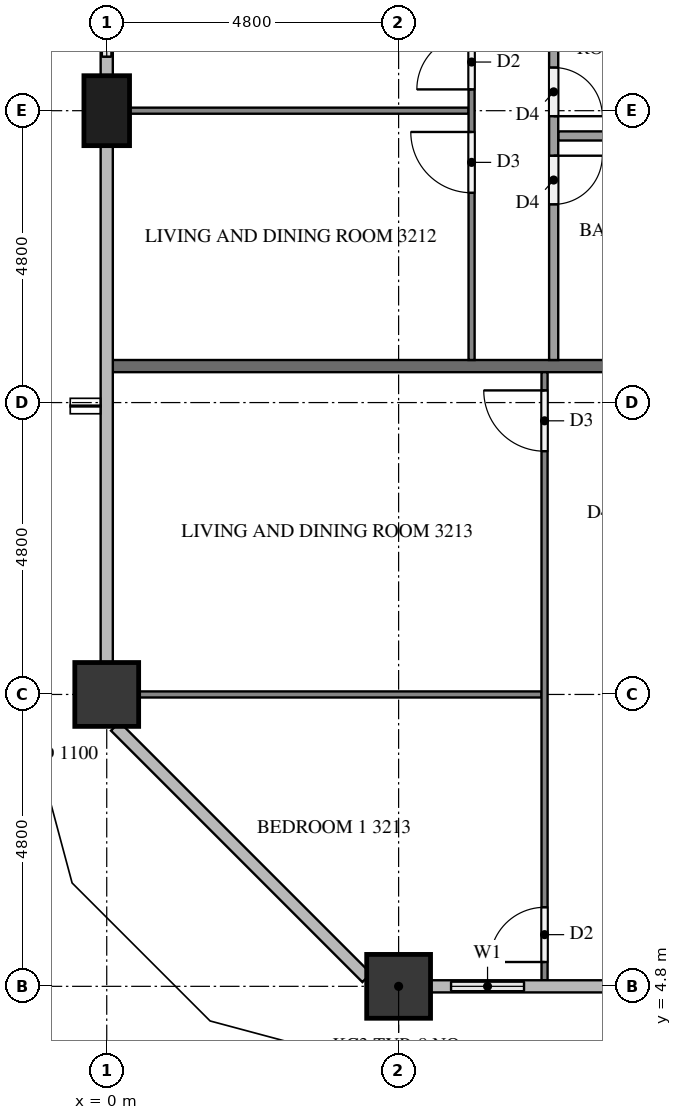
"""IFC4 building model, lengths in metres.
Left out: names, types, materials, properties, quantities, classifications, styles, units other than length and angle.
Written with IfcOpenShell. Run it as: python <this file> out.ifc"""

import sys

from ifc_helpers import new_model, si_unit, direction, frame, frame_2d, origin, origin_2d, place, context, subcontext, project, spatial, rectangle, extrude, element, fill, save


model = new_model("IFC4")
c1 = context("Model", 3, precision=1e-05, world=origin(), true_north=direction((0.0, 1.0)))
c2 = subcontext(c1, "Body", "Model", "MODEL_VIEW")
j1 = project(units=[si_unit("LENGTHUNIT", "METRE"), si_unit("PLANEANGLEUNIT", "RADIAN")], contexts=[c1])
p1 = place(None, origin())
s1 = spatial("IfcSite", under=j1, at=p1, CompositionType="ELEMENT")
p2 = place(p1, origin())
s2 = spatial("IfcBuilding", under=s1, at=p2, CompositionType="ELEMENT")
p3 = place(p2, frame((0.0, 0.0, 126.1)))
s3 = spatial("IfcBuildingStorey", under=s2, at=p3, CompositionType="ELEMENT", Elevation=126.1)
p4 = place(p3, frame((4.8, 4.8, 0.0), z_axis=(0.0, 0.0, 1.0), x_axis=(1.0, 0.0, 0.0)))
e1 = element("IfcColumn", 1, at=p4, inside=s3, PredefinedType="COLUMN", context=c2, shape_type="SweptSolid", body=[
    extrude(rectangle(XDim=1.05, YDim=1.05, at=origin_2d()), origin(), (0.0, 0.0, 1.0), 3.2),
])
p5 = place(p3, frame((0.0, 19.2, 0.0), z_axis=(0.0, 0.0, 1.0), x_axis=(0.0, 1.0, 0.0)))
e2 = element("IfcColumn", 2, at=p5, inside=s3, PredefinedType="COLUMN", context=c2, shape_type="SweptSolid", body=[
    extrude(rectangle(XDim=1.15, YDim=0.75, at=origin_2d()), origin(), (0.0, 0.0, 1.0), 3.2),
])
p6 = place(p3, frame((0.0, 9.6, 0.0), z_axis=(0.0, 0.0, 1.0), x_axis=(1.0, 0.0, 0.0)))
e3 = element("IfcColumn", 3, at=p6, inside=s3, PredefinedType="COLUMN", context=c2, shape_type="SweptSolid", body=[
    extrude(rectangle(XDim=1.05, YDim=1.05, at=origin_2d()), origin(), (0.0, 0.0, 1.0), 3.2),
])
p7 = place(p3, frame((5.325, 4.8, 0.0), z_axis=(0.0, 0.0, 1.0), x_axis=(1.0, 0.0, 0.0)))
e4 = element("IfcWall", 4, at=p7, inside=s3, PredefinedType="SOLIDWALL", context=c2, shape_type="SweptSolid", body=[
    extrude(rectangle(XDim=1.875, YDim=0.15, at=frame_2d((0.938, 0.0))), origin(), (0.0, 0.0, 1.0), 3.2),
])
p8 = place(p7, frame((0.337, 0.0, 0.9)))
e5 = element("IfcOpeningElement", 5, at=p8, cuts=e4, PredefinedType="OPENING", context=c2, shape_type="SweptSolid", body=[
    extrude(rectangle(XDim=1.2, YDim=1.4, at=frame_2d((0.6, 0.7))), frame((0.0, 0.085, 0.0), z_axis=(0.0, -1.0, 0.0), x_axis=(1.0, 0.0, 0.0)), (0.0, 0.0, 1.0), 0.17),
])
p9 = place(p3, frame((0.0, 21.6, 0.0), z_axis=(0.0, 0.0, 1.0), x_axis=(0.0, -1.0, 0.0)))
e6 = element("IfcWall", 6, at=p9, inside=s3, PredefinedType="SOLIDWALL", context=c2, shape_type="SweptSolid", body=[
    extrude(rectangle(XDim=1.825, YDim=0.15, at=frame_2d((0.913, 0.0))), origin(), (0.0, 0.0, 1.0), 3.2),
])
p10 = place(p9, frame((0.312, 0.0, 0.9)))
e7 = element("IfcOpeningElement", 7, at=p10, cuts=e6, PredefinedType="OPENING", context=c2, shape_type="SweptSolid", body=[
    extrude(rectangle(XDim=1.2, YDim=1.4, at=frame_2d((0.6, 0.7))), frame((0.0, 0.085, 0.0), z_axis=(0.0, -1.0, 0.0), x_axis=(1.0, 0.0, 0.0)), (0.0, 0.0, 1.0), 0.17),
])
p11 = place(p3, frame((0.1, 15.0, 0.0), z_axis=(0.0, 0.0, 1.0), x_axis=(1.0, 0.0, 0.0)))
e8 = element("IfcWall", 8, at=p11, inside=s3, PredefinedType="PARTITIONING", context=c2, shape_type="SweptSolid", body=[
    extrude(rectangle(XDim=9.8, YDim=0.2, at=frame_2d((4.9, 0.0))), origin(), (0.0, 0.0, 1.0), 3.2),
])
p12 = place(p3, frame((5.95, 19.2, 0.0), z_axis=(0.0, 0.0, 1.0), x_axis=(-1.0, 0.0, 0.0)))
e9 = element("IfcWall", 9, at=p12, inside=s3, PredefinedType="PARTITIONING", context=c2, shape_type="SweptSolid", body=[
    extrude(rectangle(XDim=5.575, YDim=0.1, at=frame_2d((2.788, 0.0))), origin(), (0.0, 0.0, 1.0), 3.2),
])
p13 = place(p3, frame((6.0, 15.1, 0.0), z_axis=(0.0, 0.0, 1.0), x_axis=(0.0, 1.0, 0.0)))
e10 = element("IfcWall", 10, at=p13, inside=s3, PredefinedType="PARTITIONING", context=c2, shape_type="SweptSolid", body=[
    extrude(rectangle(XDim=13.6, YDim=0.1, at=frame_2d((6.8, 0.0))), origin(), (0.0, 0.0, 1.0), 3.2),
])
p14 = place(p13, frame((12.4, 0.0, 0.0)))
e11 = element("IfcOpeningElement", 11, at=p14, cuts=e10, PredefinedType="OPENING", context=c2, shape_type="SweptSolid", body=[
    extrude(rectangle(XDim=0.9, YDim=2.1, at=frame_2d((0.45, 1.05))), frame((0.0, 0.06, 0.0), z_axis=(0.0, -1.0, 0.0), x_axis=(1.0, 0.0, 0.0)), (0.0, 0.0, 1.0), 0.12),
])
p15 = place(p13, frame((4.45, 0.0, 0.0)))
e12 = element("IfcOpeningElement", 12, at=p15, cuts=e10, PredefinedType="OPENING", context=c2, shape_type="SweptSolid", body=[
    extrude(rectangle(XDim=0.9, YDim=2.1, at=frame_2d((0.45, 1.05))), frame((0.0, 0.06, 0.0), z_axis=(0.0, -1.0, 0.0), x_axis=(1.0, 0.0, 0.0)), (0.0, 0.0, 1.0), 0.12),
])
p16 = place(p13, frame((2.75, 0.0, 0.0)))
e13 = element("IfcOpeningElement", 13, at=p16, cuts=e10, PredefinedType="OPENING", context=c2, shape_type="SweptSolid", body=[
    extrude(rectangle(XDim=1.0, YDim=2.1, at=frame_2d((0.5, 1.05))), frame((0.0, 0.06, 0.0), z_axis=(0.0, -1.0, 0.0), x_axis=(1.0, 0.0, 0.0)), (0.0, 0.0, 1.0), 0.12),
])
p17 = place(p3, frame((9.9, 18.785, 0.0), z_axis=(0.0, 0.0, 1.0), x_axis=(-1.0, 0.0, 0.0)))
e14 = element("IfcWall", 14, at=p17, inside=s3, PredefinedType="PARTITIONING", context=c2, shape_type="SweptSolid", body=[
    extrude(rectangle(XDim=2.475, YDim=0.15, at=frame_2d((1.237, 0.0))), origin(), (0.0, 0.0, 1.0), 3.2),
])
p18 = place(p3, frame((7.35, 27.075, 0.0), z_axis=(0.0, 0.0, 1.0), x_axis=(0.0, -1.0, 0.0)))
e15 = element("IfcWall", 15, at=p18, inside=s3, PredefinedType="PARTITIONING", context=c2, shape_type="SweptSolid", body=[
    extrude(rectangle(XDim=11.975, YDim=0.15, at=frame_2d((5.987, 0.0))), origin(), (0.0, 0.0, 1.0), 3.2),
])
p19 = place(p18, frame((0.3, 0.0, 0.0)))
e16 = element("IfcOpeningElement", 16, at=p19, cuts=e15, PredefinedType="OPENING", context=c2, shape_type="SweptSolid", body=[
    extrude(rectangle(XDim=0.9, YDim=2.1, at=frame_2d((0.45, 1.05))), frame((0.0, 0.085, 0.0), z_axis=(0.0, -1.0, 0.0), x_axis=(1.0, 0.0, 0.0)), (0.0, 0.0, 1.0), 0.17),
])
p20 = place(p18, frame((7.165, 0.0, 0.0)))
e17 = element("IfcOpeningElement", 17, at=p20, cuts=e15, PredefinedType="OPENING", context=c2, shape_type="SweptSolid", body=[
    extrude(rectangle(XDim=0.8, YDim=2.1, at=frame_2d((0.4, 1.05))), frame((0.0, 0.085, 0.0), z_axis=(0.0, -1.0, 0.0), x_axis=(1.0, 0.0, 0.0)), (0.0, 0.0, 1.0), 0.17),
])
p21 = place(p18, frame((8.615, 0.0, 0.0)))
e18 = element("IfcOpeningElement", 18, at=p21, cuts=e15, PredefinedType="OPENING", context=c2, shape_type="SweptSolid", body=[
    extrude(rectangle(XDim=0.8, YDim=2.1, at=frame_2d((0.4, 1.05))), frame((0.0, 0.085, 0.0), z_axis=(0.0, -1.0, 0.0), x_axis=(1.0, 0.0, 0.0)), (0.0, 0.0, 1.0), 0.17),
])
p22 = place(p3, frame((7.15, 9.6, 0.0), z_axis=(0.0, 0.0, 1.0), x_axis=(-1.0, 0.0, 0.0)))
e19 = element("IfcWall", 19, at=p22, inside=s3, PredefinedType="PARTITIONING", context=c2, shape_type="SweptSolid", body=[
    extrude(rectangle(XDim=6.625, YDim=0.1, at=frame_2d((3.312, 0.0))), origin(), (0.0, 0.0, 1.0), 3.2),
])
p23 = place(p3, frame((7.2, 4.9, 0.0), z_axis=(0.0, 0.0, 1.0), x_axis=(0.0, 1.0, 0.0)))
e20 = element("IfcWall", 20, at=p23, inside=s3, PredefinedType="PARTITIONING", context=c2, shape_type="SweptSolid", body=[
    extrude(rectangle(XDim=10.0, YDim=0.1, at=frame_2d((5.0, 0.0))), origin(), (0.0, 0.0, 1.0), 3.2),
])
p24 = place(p23, frame((8.7, 0.0, 0.0)))
e21 = element("IfcOpeningElement", 21, at=p24, cuts=e20, PredefinedType="OPENING", context=c2, shape_type="SweptSolid", body=[
    extrude(rectangle(XDim=1.0, YDim=2.1, at=frame_2d((0.5, 1.05))), frame((0.0, 0.06, 0.0), z_axis=(0.0, -1.0, 0.0), x_axis=(1.0, 0.0, 0.0)), (0.0, 0.0, 1.0), 0.12),
])
p25 = place(p23, frame((0.3, 0.0, 0.0)))
e22 = element("IfcOpeningElement", 22, at=p25, cuts=e20, PredefinedType="OPENING", context=c2, shape_type="SweptSolid", body=[
    extrude(rectangle(XDim=0.9, YDim=2.1, at=frame_2d((0.45, 1.05))), frame((0.0, 0.06, 0.0), z_axis=(0.0, -1.0, 0.0), x_axis=(1.0, 0.0, 0.0)), (0.0, 0.0, 1.0), 0.12),
])
p26 = place(p8, origin())
e23 = element("IfcWindow", 23, at=p26, inside=s3, PartitioningType="SINGLE_PANEL", PredefinedType="WINDOW", context=c2, shape_type="SweptSolid", body=[
    extrude(rectangle(XDim=1.2, YDim=1.4, at=frame_2d((0.6, 0.7))), frame((0.0, 0.03, 0.0), z_axis=(0.0, -1.0, 0.0), x_axis=(1.0, 0.0, 0.0)), (0.0, 0.0, 1.0), 0.06),
])
fill(e5, e23)
p27 = place(p10, origin())
e24 = element("IfcWindow", 24, at=p27, inside=s3, PartitioningType="SINGLE_PANEL", PredefinedType="WINDOW", context=c2, shape_type="SweptSolid", body=[
    extrude(rectangle(XDim=1.2, YDim=1.4, at=frame_2d((0.6, 0.7))), frame((0.0, 0.03, 0.0), z_axis=(0.0, -1.0, 0.0), x_axis=(1.0, 0.0, 0.0)), (0.0, 0.0, 1.0), 0.06),
])
fill(e7, e24)
p28 = place(p15, origin())
e25 = element("IfcDoor", 25, at=p28, inside=s3, OperationType="SINGLE_SWING_LEFT", PredefinedType="DOOR", context=c2, shape_type="SweptSolid", body=[
    extrude(rectangle(XDim=0.9, YDim=2.1, at=frame_2d((0.45, 1.05))), frame((0.0, 0.025, 0.0), z_axis=(0.0, -1.0, 0.0), x_axis=(1.0, 0.0, 0.0)), (0.0, 0.0, 1.0), 0.05),
])
fill(e12, e25)
p29 = place(p16, origin())
e26 = element("IfcDoor", 26, at=p29, inside=s3, OperationType="SINGLE_SWING_RIGHT", PredefinedType="DOOR", context=c2, shape_type="SweptSolid", body=[
    extrude(rectangle(XDim=1.0, YDim=2.1, at=frame_2d((0.5, 1.05))), frame((0.0, 0.025, 0.0), z_axis=(0.0, -1.0, 0.0), x_axis=(1.0, 0.0, 0.0)), (0.0, 0.0, 1.0), 0.05),
])
fill(e13, e26)
p30 = place(p20, origin())
e27 = element("IfcDoor", 27, at=p30, inside=s3, OperationType="SINGLE_SWING_RIGHT", PredefinedType="DOOR", context=c2, shape_type="SweptSolid", body=[
    extrude(rectangle(XDim=0.8, YDim=2.1, at=frame_2d((0.4, 1.05))), frame((0.0, 0.025, 0.0), z_axis=(0.0, -1.0, 0.0), x_axis=(1.0, 0.0, 0.0)), (0.0, 0.0, 1.0), 0.05),
])
fill(e17, e27)
p31 = place(p21, origin())
e28 = element("IfcDoor", 28, at=p31, inside=s3, OperationType="SINGLE_SWING_LEFT", PredefinedType="DOOR", context=c2, shape_type="SweptSolid", body=[
    extrude(rectangle(XDim=0.8, YDim=2.1, at=frame_2d((0.4, 1.05))), frame((0.0, 0.025, 0.0), z_axis=(0.0, -1.0, 0.0), x_axis=(1.0, 0.0, 0.0)), (0.0, 0.0, 1.0), 0.05),
])
fill(e18, e28)
p32 = place(p24, origin())
e29 = element("IfcDoor", 29, at=p32, inside=s3, OperationType="SINGLE_SWING_RIGHT", PredefinedType="DOOR", context=c2, shape_type="SweptSolid", body=[
    extrude(rectangle(XDim=1.0, YDim=2.1, at=frame_2d((0.5, 1.05))), frame((0.0, 0.025, 0.0), z_axis=(0.0, -1.0, 0.0), x_axis=(1.0, 0.0, 0.0)), (0.0, 0.0, 1.0), 0.05),
])
fill(e21, e29)
p33 = place(p25, origin())
e30 = element("IfcDoor", 30, at=p33, inside=s3, OperationType="SINGLE_SWING_LEFT", PredefinedType="DOOR", context=c2, shape_type="SweptSolid", body=[
    extrude(rectangle(XDim=0.9, YDim=2.1, at=frame_2d((0.45, 1.05))), frame((0.0, 0.025, 0.0), z_axis=(0.0, -1.0, 0.0), x_axis=(1.0, 0.0, 0.0)), (0.0, 0.0, 1.0), 0.05),
])
fill(e22, e30)
save(model, sys.argv[1])
